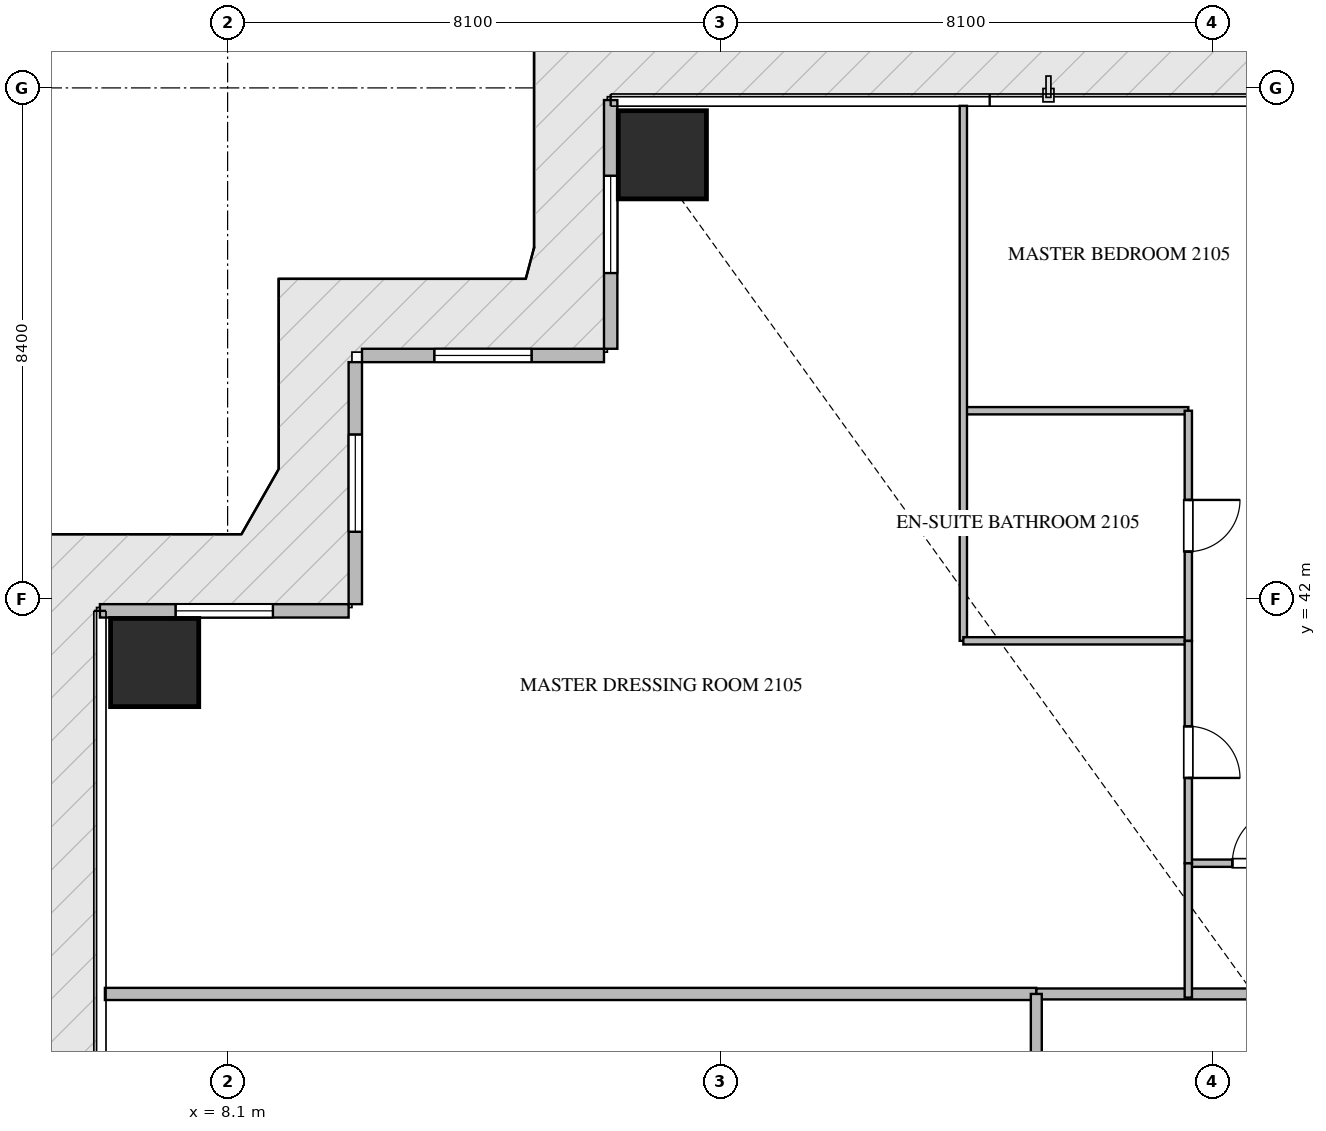
"""IFC4 building model, lengths in metres.
Left out: names, types, materials, properties, quantities, classifications, styles, units other than length and angle.
Written with IfcOpenShell. Run it as: python <this file> out.ifc"""

import sys

from ifc_helpers import new_model, si_unit, direction, frame, frame_2d, origin, origin_2d, place, context, subcontext, project, spatial, rectangle, extrude, source, transform, mapped, element, fill, save


model = new_model("IFC4")
c1 = context("Model", 3, precision=1e-05, world=origin(), true_north=direction((0.0, 1.0)))
c2 = subcontext(c1, "Body", "Model", "MODEL_VIEW")
j1 = project(units=[si_unit("LENGTHUNIT", "METRE"), si_unit("PLANEANGLEUNIT", "RADIAN")], contexts=[c1])
p1 = place(None, origin())
s1 = spatial("IfcSite", under=j1, at=p1, CompositionType="ELEMENT")
p2 = place(p1, origin())
s2 = spatial("IfcBuilding", under=s1, at=p2, CompositionType="ELEMENT")
p3 = place(p2, frame((0.0, 0.0, 86.7)))
s3 = spatial("IfcBuildingStorey", under=s2, at=p3, CompositionType="ELEMENT", Elevation=86.7)
m1 = source(origin(), c2, "Body", "SweptSolid", [
    extrude(rectangle(XDim=1.45, YDim=1.45, at=origin_2d()), origin(), (0.0, 0.0, 1.0), 3.75),
])
for number, where, z_axis, x_axis in (
    (1, (15.25, 49.3, -0.26), (0.0, 0.0, 1.0), (1.0, 0.0, 0.0)),
    (2, (6.9, 40.95, -0.26), (0.0, 0.0, 1.0), (1.0, 0.0, 0.0)),
):
    element("IfcColumn", number, at=place(p3, frame(where, z_axis=z_axis, x_axis=x_axis)), inside=s3, PredefinedType="COLUMN", context=c2, shape_type="MappedRepresentation", body=[
        mapped(m1, transform((0.0, 0.0, 0.0), scale=1.0)),
    ])
p4 = place(p3, frame((14.4, 50.2, 0.0), z_axis=(0.0, 0.0, 1.0), x_axis=(0.0, -1.0, 0.0)))
e3 = element("IfcWall", 3, at=p4, inside=s3, PredefinedType="ELEMENTEDWALL", context=c2, shape_type="SweptSolid", body=[
    extrude(rectangle(XDim=4.09, YDim=0.22, at=frame_2d((2.045, 0.0))), origin(), (0.0, 0.0, 1.0), 3.475),
])
p5 = place(p4, frame((1.245, 0.0, 0.65)))
e4 = element("IfcOpeningElement", 4, at=p5, cuts=e3, PredefinedType="OPENING", context=c2, shape_type="SweptSolid", body=[
    extrude(rectangle(XDim=1.6, YDim=2.1, at=frame_2d((0.8, 1.05))), frame((0.0, 0.12, 0.0), z_axis=(0.0, -1.0, 0.0), x_axis=(1.0, 0.0, 0.0)), (0.0, 0.0, 1.0), 0.24),
])
p6 = place(p3, frame((14.29, 46.0, 0.0), z_axis=(0.0, 0.0, 1.0), x_axis=(-1.0, 0.0, 0.0)))
e5 = element("IfcWall", 5, at=p6, inside=s3, PredefinedType="ELEMENTEDWALL", context=c2, shape_type="SweptSolid", body=[
    extrude(rectangle(XDim=3.98, YDim=0.22, at=frame_2d((1.99, 0.0))), origin(), (0.0, 0.0, 1.0), 3.475),
])
p7 = place(p6, frame((1.19, 0.0, 0.65)))
e6 = element("IfcOpeningElement", 6, at=p7, cuts=e5, PredefinedType="OPENING", context=c2, shape_type="SweptSolid", body=[
    extrude(rectangle(XDim=1.6, YDim=2.1, at=frame_2d((0.8, 1.05))), frame((0.0, 0.12, 0.0), z_axis=(0.0, -1.0, 0.0), x_axis=(1.0, 0.0, 0.0)), (0.0, 0.0, 1.0), 0.24),
])
p8 = place(p3, frame((10.2, 45.89, 0.0), z_axis=(0.0, 0.0, 1.0), x_axis=(0.0, -1.0, 0.0)))
e7 = element("IfcWall", 7, at=p8, inside=s3, PredefinedType="ELEMENTEDWALL", context=c2, shape_type="SweptSolid", body=[
    extrude(rectangle(XDim=3.98, YDim=0.22, at=frame_2d((1.99, 0.0))), origin(), (0.0, 0.0, 1.0), 3.475),
])
p9 = place(p8, frame((1.19, 0.0, 0.65)))
e8 = element("IfcOpeningElement", 8, at=p9, cuts=e7, PredefinedType="OPENING", context=c2, shape_type="SweptSolid", body=[
    extrude(rectangle(XDim=1.6, YDim=2.1, at=frame_2d((0.8, 1.05))), frame((0.0, 0.12, 0.0), z_axis=(0.0, -1.0, 0.0), x_axis=(1.0, 0.0, 0.0)), (0.0, 0.0, 1.0), 0.24),
])
p10 = place(p3, frame((10.09, 41.8, 0.0), z_axis=(0.0, 0.0, 1.0), x_axis=(-1.0, 0.0, 0.0)))
e9 = element("IfcWall", 9, at=p10, inside=s3, PredefinedType="ELEMENTEDWALL", context=c2, shape_type="SweptSolid", body=[
    extrude(rectangle(XDim=4.09, YDim=0.22, at=frame_2d((2.045, 0.0))), origin(), (0.0, 0.0, 1.0), 3.475),
])
p11 = place(p10, frame((1.245, 0.0, 0.65)))
e10 = element("IfcOpeningElement", 10, at=p11, cuts=e9, PredefinedType="OPENING", context=c2, shape_type="SweptSolid", body=[
    extrude(rectangle(XDim=1.6, YDim=2.1, at=frame_2d((0.8, 1.05))), frame((0.0, 0.12, 0.0), z_axis=(0.0, -1.0, 0.0), x_axis=(1.0, 0.0, 0.0)), (0.0, 0.0, 1.0), 0.24),
])
p12 = place(p3, frame((6.082, 35.5, 0.0), z_axis=(0.0, 0.0, 1.0), x_axis=(1.0, 0.0, 0.0)))
e11 = element("IfcWall", 11, at=p12, inside=s3, PredefinedType="PARTITIONING", context=c2, shape_type="SweptSolid", body=[
    extrude(rectangle(XDim=15.318, YDim=0.2, at=frame_2d((7.659, 0.0))), origin(), (0.0, 0.0, 1.0), 3.49),
])
p13 = place(p3, frame((21.402, 35.5, 0.0), z_axis=(0.0, 0.0, 1.0), x_axis=(1.0, 0.0, 0.0)))
e12 = element("IfcWall", 12, at=p13, inside=s3, PredefinedType="PARTITIONING", context=c2, shape_type="SweptSolid", body=[
    extrude(rectangle(XDim=21.996, YDim=0.18, at=frame_2d((10.998, 0.0))), origin(), (0.0, 0.0, 1.0), 3.49),
])
p14 = place(p13, frame((15.222, 0.0, 0.0)))
e13 = element("IfcOpeningElement", 13, at=p14, cuts=e12, PredefinedType="OPENING", context=c2, shape_type="SweptSolid", body=[
    extrude(rectangle(XDim=1.0, YDim=2.15, at=frame_2d((0.5, 1.075))), frame((0.0, 0.1, 0.0), z_axis=(0.0, -1.0, 0.0), x_axis=(1.0, 0.0, 0.0)), (0.0, 0.0, 1.0), 0.2),
])
p15 = place(p3, frame((21.4, 14.9, 0.0), z_axis=(0.0, 0.0, 1.0), x_axis=(0.0, 1.0, 0.0)))
e14 = element("IfcWall", 14, at=p15, inside=s3, PredefinedType="PARTITIONING", context=c2, shape_type="SweptSolid", body=[
    extrude(rectangle(XDim=20.6, YDim=0.18, at=frame_2d((10.3, 0.0))), origin(), (0.0, 0.0, 1.0), 3.49),
])
p16 = place(p15, frame((5.625, 0.0, 0.0)))
e15 = element("IfcOpeningElement", 15, at=p16, cuts=e14, PredefinedType="OPENING", context=c2, shape_type="SweptSolid", body=[
    extrude(rectangle(XDim=1.0, YDim=2.15, at=frame_2d((0.5, 1.075))), frame((0.0, 0.1, 0.0), z_axis=(0.0, -1.0, 0.0), x_axis=(1.0, 0.0, 0.0)), (0.0, 0.0, 1.0), 0.2),
])
p17 = place(p15, frame((17.64, 0.0, 0.0)))
e16 = element("IfcOpeningElement", 16, at=p17, cuts=e14, PredefinedType="OPENING", context=c2, shape_type="SweptSolid", body=[
    extrude(rectangle(XDim=1.0, YDim=2.15, at=frame_2d((0.5, 1.075))), frame((0.0, 0.1, 0.0), z_axis=(0.0, -1.0, 0.0), x_axis=(1.0, 0.0, 0.0)), (0.0, 0.0, 1.0), 0.2),
])
p18 = place(p3, frame((23.9, 37.65, 0.0), z_axis=(0.0, 0.0, 1.0), x_axis=(1.0, 0.0, 0.0)))
e17 = element("IfcWall", 17, at=p18, inside=s3, PredefinedType="PARTITIONING", context=c2, shape_type="SweptSolid", body=[
    extrude(rectangle(XDim=2.348, YDim=0.12, at=frame_2d((1.174, 0.0))), origin(), (0.0, 0.0, 1.0), 3.49),
])
p19 = place(p18, frame((0.724, 0.0, 0.0)))
e18 = element("IfcOpeningElement", 18, at=p19, cuts=e17, PredefinedType="OPENING", context=c2, shape_type="SweptSolid", body=[
    extrude(rectangle(XDim=0.9, YDim=2.1, at=frame_2d((0.45, 1.05))), frame((0.0, 0.07, 0.0), z_axis=(0.0, -1.0, 0.0), x_axis=(1.0, 0.0, 0.0)), (0.0, 0.0, 1.0), 0.14),
])
p20 = place(p3, frame((20.2, 45.091, 0.0), z_axis=(0.0, 0.0, 1.0), x_axis=(1.0, 0.0, 0.0)))
e19 = element("IfcWall", 19, at=p20, inside=s3, PredefinedType="PARTITIONING", context=c2, shape_type="SweptSolid", body=[
    extrude(rectangle(XDim=3.7, YDim=0.12, at=frame_2d((1.85, 0.0))), origin(), (0.0, 0.0, 1.0), 3.49),
])
p21 = place(p3, frame((20.2, 50.105, 0.0), z_axis=(0.0, 0.0, 1.0), x_axis=(0.0, -1.0, 0.0)))
e20 = element("IfcWall", 20, at=p21, inside=s3, PredefinedType="PARTITIONING", context=c2, shape_type="SweptSolid", body=[
    extrude(rectangle(XDim=8.798, YDim=0.12, at=frame_2d((4.399, 0.0))), origin(), (0.0, 0.0, 1.0), 3.49),
])
p22 = place(p3, frame((20.2, 41.307, 0.0), z_axis=(0.0, 0.0, 1.0), x_axis=(1.0, 0.0, 0.0)))
e21 = element("IfcWall", 21, at=p22, inside=s3, PredefinedType="PARTITIONING", context=c2, shape_type="SweptSolid", body=[
    extrude(rectangle(XDim=3.7, YDim=0.12, at=frame_2d((1.85, 0.0))), origin(), (0.0, 0.0, 1.0), 3.49),
])
p23 = place(p3, frame((23.9, 45.091, 0.0), z_axis=(0.0, 0.0, 1.0), x_axis=(0.0, -1.0, 0.0)))
e22 = element("IfcWall", 22, at=p23, inside=s3, PredefinedType="PARTITIONING", context=c2, shape_type="SweptSolid", body=[
    extrude(rectangle(XDim=3.784, YDim=0.12, at=frame_2d((1.892, 0.0))), origin(), (0.0, 0.0, 1.0), 3.49),
])
p24 = place(p23, frame((1.467, 0.0, 0.0)))
e23 = element("IfcOpeningElement", 23, at=p24, cuts=e22, PredefinedType="OPENING", context=c2, shape_type="SweptSolid", body=[
    extrude(rectangle(XDim=0.85, YDim=2.1, at=frame_2d((0.425, 1.05))), frame((0.0, 0.07, 0.0), z_axis=(0.0, -1.0, 0.0), x_axis=(1.0, 0.0, 0.0)), (0.0, 0.0, 1.0), 0.14),
])
p25 = place(p3, frame((23.9, 41.305, 0.0), z_axis=(0.0, 0.0, 1.0), x_axis=(0.0, -1.0, 0.0)))
e24 = element("IfcWall", 24, at=p25, inside=s3, PredefinedType="PARTITIONING", context=c2, shape_type="SweptSolid", body=[
    extrude(rectangle(XDim=3.655, YDim=0.12, at=frame_2d((1.828, 0.0))), origin(), (0.0, 0.0, 1.0), 3.49),
])
p26 = place(p25, frame((1.403, 0.0, 0.0)))
e25 = element("IfcOpeningElement", 25, at=p26, cuts=e24, PredefinedType="OPENING", context=c2, shape_type="SweptSolid", body=[
    extrude(rectangle(XDim=0.85, YDim=2.1, at=frame_2d((0.425, 1.05))), frame((0.0, 0.07, 0.0), z_axis=(0.0, -1.0, 0.0), x_axis=(1.0, 0.0, 0.0)), (0.0, 0.0, 1.0), 0.14),
])
p27 = place(p3, frame((23.9, 37.648, 0.0), z_axis=(0.0, 0.0, 1.0), x_axis=(0.0, -1.0, 0.0)))
e26 = element("IfcWall", 26, at=p27, inside=s3, PredefinedType="PARTITIONING", context=c2, shape_type="SweptSolid", body=[
    extrude(rectangle(XDim=2.208, YDim=0.12, at=frame_2d((1.104, 0.0))), origin(), (0.0, 0.0, 1.0), 3.49),
])
m2 = source(origin(), c2, "Body", "SweptSolid", [
    extrude(rectangle(XDim=1.6, YDim=2.1, at=frame_2d((0.8, 1.05))), frame((0.0, 0.03, 0.0), z_axis=(0.0, -1.0, 0.0), x_axis=(1.0, 0.0, 0.0)), (0.0, 0.0, 1.0), 0.06),
])
p28 = place(p5, origin())
e27 = element("IfcWindow", 27, at=p28, inside=s3, PartitioningType="SINGLE_PANEL", PredefinedType="WINDOW", context=c2, shape_type="MappedRepresentation", body=[
    mapped(m2, transform((0.0, 0.0, 0.0), scale=1.0)),
])
fill(e4, e27)
p29 = place(p7, origin())
e28 = element("IfcWindow", 28, at=p29, inside=s3, PartitioningType="SINGLE_PANEL", PredefinedType="WINDOW", context=c2, shape_type="MappedRepresentation", body=[
    mapped(m2, transform((0.0, 0.0, 0.0), scale=1.0)),
])
fill(e6, e28)
p30 = place(p9, origin())
e29 = element("IfcWindow", 29, at=p30, inside=s3, PartitioningType="SINGLE_PANEL", PredefinedType="WINDOW", context=c2, shape_type="MappedRepresentation", body=[
    mapped(m2, transform((0.0, 0.0, 0.0), scale=1.0)),
])
fill(e8, e29)
p31 = place(p11, origin())
e30 = element("IfcWindow", 30, at=p31, inside=s3, PartitioningType="SINGLE_PANEL", PredefinedType="WINDOW", context=c2, shape_type="MappedRepresentation", body=[
    mapped(m2, transform((0.0, 0.0, 0.0), scale=1.0)),
])
fill(e10, e30)
m3 = source(origin(), c2, "Body", "SweptSolid", [
    extrude(rectangle(XDim=0.9, YDim=2.1, at=frame_2d((0.45, 1.05))), frame((0.0, 0.025, 0.0), z_axis=(0.0, -1.0, 0.0), x_axis=(1.0, 0.0, 0.0)), (0.0, 0.0, 1.0), 0.05),
])
p32 = place(p19, origin())
e31 = element("IfcDoor", 31, at=p32, inside=s3, OperationType="SINGLE_SWING_RIGHT", PredefinedType="DOOR", context=c2, shape_type="MappedRepresentation", body=[
    mapped(m3, transform((0.0, 0.0, 0.0), scale=1.0)),
])
fill(e18, e31)
m4 = source(origin(), c2, "Body", "SweptSolid", [
    extrude(rectangle(XDim=0.85, YDim=2.1, at=frame_2d((0.425, 1.05))), frame((0.0, 0.025, 0.0), z_axis=(0.0, -1.0, 0.0), x_axis=(1.0, 0.0, 0.0)), (0.0, 0.0, 1.0), 0.05),
])
p33 = place(p24, origin())
e32 = element("IfcDoor", 32, at=p33, inside=s3, OperationType="SINGLE_SWING_LEFT", PredefinedType="DOOR", context=c2, shape_type="MappedRepresentation", body=[
    mapped(m4, transform((0.0, 0.0, 0.0), scale=1.0)),
])
fill(e23, e32)
p34 = place(p26, origin())
e33 = element("IfcDoor", 33, at=p34, inside=s3, OperationType="SINGLE_SWING_RIGHT", PredefinedType="DOOR", context=c2, shape_type="MappedRepresentation", body=[
    mapped(m4, transform((0.0, 0.0, 0.0), scale=1.0)),
])
fill(e25, e33)
save(model, sys.argv[1])
